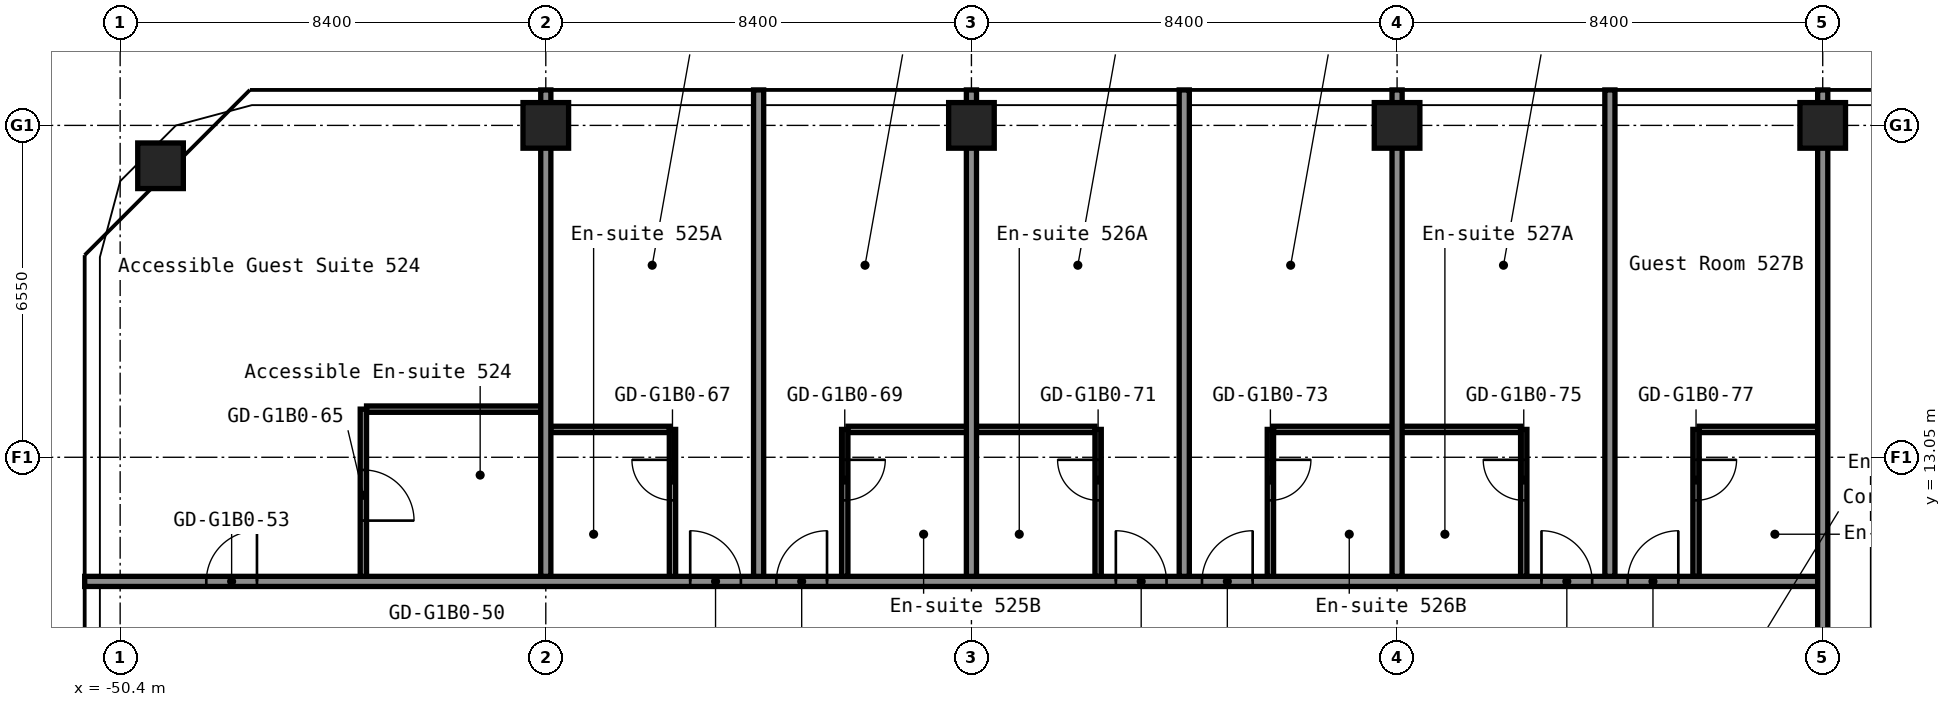
"""IFC4 building model, lengths in metres.
Left out: names, types, materials, properties, quantities, classifications, styles, units other than length and angle.
Written with IfcOpenShell. Run it as: python <this file> out.ifc"""

import sys

from ifc_helpers import new_model, si_unit, direction, frame, frame_2d, origin, origin_2d, place, context, subcontext, project, spatial, rectangle, hollow_rectangle, extrude, element, fill, save


model = new_model("IFC4")
c1 = context("Model", 3, precision=1e-05, world=origin(), true_north=direction((0.0, 1.0)))
c2 = subcontext(c1, "Body", "Model", "MODEL_VIEW")
j1 = project(units=[si_unit("LENGTHUNIT", "METRE"), si_unit("PLANEANGLEUNIT", "RADIAN")], contexts=[c1])
p1 = place(None, origin())
s1 = spatial("IfcSite", under=j1, at=p1, CompositionType="ELEMENT")
p2 = place(p1, origin())
s2 = spatial("IfcBuilding", under=s1, at=p2, CompositionType="ELEMENT")
p3 = place(p2, frame((0.0, 0.0, 23.0)))
s3 = spatial("IfcBuildingStorey", under=s2, at=p3, CompositionType="ELEMENT", Elevation=23.0)
for number, where, z_axis, x_axis in (
    (1, (-49.603, 18.803, 0.0), (0.0, 0.0, 1.0), (1.0, 0.0, 0.0)),
    (2, (-42.0, 19.6, 0.0), (0.0, 0.0, 1.0), (1.0, 0.0, 0.0)),
    (3, (-33.6, 19.6, 0.0), (0.0, 0.0, 1.0), (1.0, 0.0, 0.0)),
    (4, (-25.2, 19.6, 0.0), (0.0, 0.0, 1.0), (1.0, 0.0, 0.0)),
    (5, (-16.8, 19.6, 0.0), (0.0, 0.0, 1.0), (1.0, 0.0, 0.0)),
):
    element("IfcColumn", number, at=place(p3, frame(where, z_axis=z_axis, x_axis=x_axis)), inside=s3, PredefinedType="COLUMN", context=c2, shape_type="SweptSolid", body=[
        extrude(hollow_rectangle(XDim=0.9, YDim=0.9, WallThickness=0.036, at=origin_2d()), origin(), (0.0, 0.0, 1.0), 2.8),
    ])
p4 = place(p3, frame((-51.1, 10.6, 0.0), z_axis=(0.0, 0.0, 1.0), x_axis=(1.0, 0.0, 0.0)))
e6 = element("IfcWall", 6, at=p4, inside=s3, PredefinedType="PARTITIONING", context=c2, shape_type="SweptSolid", body=[
    extrude(rectangle(XDim=34.3, YDim=0.2, at=frame_2d((17.15, 0.0))), origin(), (0.0, 0.0, 1.0), 2.8),
])
p5 = place(p4, frame((2.4, 0.0, 0.0)))
e7 = element("IfcOpeningElement", 7, at=p5, cuts=e6, PredefinedType="OPENING", context=c2, shape_type="SweptSolid", body=[
    extrude(rectangle(XDim=1.0, YDim=2.1, at=frame_2d((0.5, 1.05))), frame((0.0, 0.11, 0.0), z_axis=(0.0, -1.0, 0.0), x_axis=(1.0, 0.0, 0.0)), (0.0, 0.0, 1.0), 0.22),
])
p6 = place(p4, frame((11.95, 0.0, 0.0)))
e8 = element("IfcOpeningElement", 8, at=p6, cuts=e6, PredefinedType="OPENING", context=c2, shape_type="SweptSolid", body=[
    extrude(rectangle(XDim=1.0, YDim=2.1, at=frame_2d((0.5, 1.05))), frame((0.0, 0.11, 0.0), z_axis=(0.0, -1.0, 0.0), x_axis=(1.0, 0.0, 0.0)), (0.0, 0.0, 1.0), 0.22),
])
p7 = place(p4, frame((13.65, 0.0, 0.0)))
e9 = element("IfcOpeningElement", 9, at=p7, cuts=e6, PredefinedType="OPENING", context=c2, shape_type="SweptSolid", body=[
    extrude(rectangle(XDim=1.0, YDim=2.1, at=frame_2d((0.5, 1.05))), frame((0.0, 0.11, 0.0), z_axis=(0.0, -1.0, 0.0), x_axis=(1.0, 0.0, 0.0)), (0.0, 0.0, 1.0), 0.22),
])
p8 = place(p4, frame((20.35, 0.0, 0.0)))
e10 = element("IfcOpeningElement", 10, at=p8, cuts=e6, PredefinedType="OPENING", context=c2, shape_type="SweptSolid", body=[
    extrude(rectangle(XDim=1.0, YDim=2.1, at=frame_2d((0.5, 1.05))), frame((0.0, 0.11, 0.0), z_axis=(0.0, -1.0, 0.0), x_axis=(1.0, 0.0, 0.0)), (0.0, 0.0, 1.0), 0.22),
])
p9 = place(p4, frame((22.05, 0.0, 0.0)))
e11 = element("IfcOpeningElement", 11, at=p9, cuts=e6, PredefinedType="OPENING", context=c2, shape_type="SweptSolid", body=[
    extrude(rectangle(XDim=1.0, YDim=2.1, at=frame_2d((0.5, 1.05))), frame((0.0, 0.11, 0.0), z_axis=(0.0, -1.0, 0.0), x_axis=(1.0, 0.0, 0.0)), (0.0, 0.0, 1.0), 0.22),
])
p10 = place(p4, frame((28.75, 0.0, 0.0)))
e12 = element("IfcOpeningElement", 12, at=p10, cuts=e6, PredefinedType="OPENING", context=c2, shape_type="SweptSolid", body=[
    extrude(rectangle(XDim=1.0, YDim=2.1, at=frame_2d((0.5, 1.05))), frame((0.0, 0.11, 0.0), z_axis=(0.0, -1.0, 0.0), x_axis=(1.0, 0.0, 0.0)), (0.0, 0.0, 1.0), 0.22),
])
p11 = place(p4, frame((30.45, 0.0, 0.0)))
e13 = element("IfcOpeningElement", 13, at=p11, cuts=e6, PredefinedType="OPENING", context=c2, shape_type="SweptSolid", body=[
    extrude(rectangle(XDim=1.0, YDim=2.1, at=frame_2d((0.5, 1.05))), frame((0.0, 0.11, 0.0), z_axis=(0.0, -1.0, 0.0), x_axis=(1.0, 0.0, 0.0)), (0.0, 0.0, 1.0), 0.22),
])
p12 = place(p3, frame((-41.9, 13.6, 0.0), z_axis=(0.0, 0.0, 1.0), x_axis=(1.0, 0.0, 0.0)))
e14 = element("IfcWall", 14, at=p12, inside=s3, PredefinedType="PARTITIONING", context=c2, shape_type="SweptSolid", body=[
    extrude(rectangle(XDim=2.337, YDim=0.125, at=frame_2d((1.169, 0.0))), origin(), (0.0, 0.0, 1.0), 2.8),
])
for number, where, z_axis, x_axis in (
    (15, (-36.038, 13.6, 0.0), (0.0, 0.0, 1.0), (1.0, 0.0, 0.0)),
    (16, (-27.637, 13.6, 0.0), (0.0, 0.0, 1.0), (1.0, 0.0, 0.0)),
):
    element("IfcWall", number, at=place(p3, frame(where, z_axis=z_axis, x_axis=x_axis)), inside=s3, PredefinedType="PARTITIONING", context=c2, shape_type="SweptSolid", body=[
        extrude(rectangle(XDim=4.875, YDim=0.125, at=frame_2d((2.438, 0.0))), origin(), (0.0, 0.0, 1.0), 2.8),
    ])
p13 = place(p3, frame((-19.238, 13.6, 0.0), z_axis=(0.0, 0.0, 1.0), x_axis=(1.0, 0.0, 0.0)))
e17 = element("IfcWall", 17, at=p13, inside=s3, PredefinedType="PARTITIONING", context=c2, shape_type="SweptSolid", body=[
    extrude(rectangle(XDim=2.338, YDim=0.125, at=frame_2d((1.169, 0.0))), origin(), (0.0, 0.0, 1.0), 2.8),
])
p14 = place(p3, frame((-45.538, 14.0, 0.0), z_axis=(0.0, 0.0, 1.0), x_axis=(1.0, 0.0, 0.0)))
e18 = element("IfcWall", 18, at=p14, inside=s3, PredefinedType="PARTITIONING", context=c2, shape_type="SweptSolid", body=[
    extrude(rectangle(XDim=3.438, YDim=0.125, at=frame_2d((1.719, 0.0))), origin(), (0.0, 0.0, 1.0), 2.8),
])
p15 = place(p3, frame((-45.6, 10.7, 0.0), z_axis=(0.0, 0.0, 1.0), x_axis=(0.0, 1.0, 0.0)))
e19 = element("IfcWall", 19, at=p15, inside=s3, PredefinedType="PARTITIONING", context=c2, shape_type="SweptSolid", body=[
    extrude(rectangle(XDim=3.3, YDim=0.125, at=frame_2d((1.65, 0.0))), origin(), (0.0, 0.0, 1.0), 2.8),
])
p16 = place(p15, frame((1.1, 0.0, 0.0)))
e20 = element("IfcOpeningElement", 20, at=p16, cuts=e19, PredefinedType="OPENING", context=c2, shape_type="SweptSolid", body=[
    extrude(rectangle(XDim=1.0, YDim=2.1, at=frame_2d((0.5, 1.05))), frame((0.0, 0.073, 0.0), z_axis=(0.0, -1.0, 0.0), x_axis=(1.0, 0.0, 0.0)), (0.0, 0.0, 1.0), 0.145),
])
p17 = place(p3, frame((-42.0, 10.7, 0.0), z_axis=(0.0, 0.0, 1.0), x_axis=(0.0, 1.0, 0.0)))
e21 = element("IfcWall", 21, at=p17, inside=s3, PredefinedType="PARTITIONING", context=c2, shape_type="SweptSolid", body=[
    extrude(rectangle(XDim=9.6, YDim=0.2, at=frame_2d((4.8, 0.0))), origin(), (0.0, 0.0, 1.0), 2.8),
])
p18 = place(p3, frame((-39.5, 10.7, 0.0), z_axis=(0.0, 0.0, 1.0), x_axis=(0.0, 1.0, 0.0)))
e22 = element("IfcWall", 22, at=p18, inside=s3, PredefinedType="PARTITIONING", context=c2, shape_type="SweptSolid", body=[
    extrude(rectangle(XDim=2.9, YDim=0.125, at=frame_2d((1.45, 0.0))), origin(), (0.0, 0.0, 1.0), 2.8),
])
p19 = place(p18, frame((1.5, 0.0, 0.0)))
e23 = element("IfcOpeningElement", 23, at=p19, cuts=e22, PredefinedType="OPENING", context=c2, shape_type="SweptSolid", body=[
    extrude(rectangle(XDim=0.8, YDim=2.1, at=frame_2d((0.4, 1.05))), frame((0.0, 0.073, 0.0), z_axis=(0.0, -1.0, 0.0), x_axis=(1.0, 0.0, 0.0)), (0.0, 0.0, 1.0), 0.145),
])
p20 = place(p3, frame((-37.8, 10.7, 0.0), z_axis=(0.0, 0.0, 1.0), x_axis=(0.0, 1.0, 0.0)))
e24 = element("IfcWall", 24, at=p20, inside=s3, PredefinedType="PARTITIONING", context=c2, shape_type="SweptSolid", body=[
    extrude(rectangle(XDim=9.6, YDim=0.2, at=frame_2d((4.8, 0.0))), origin(), (0.0, 0.0, 1.0), 2.8),
])
p21 = place(p3, frame((-36.1, 10.7, 0.0), z_axis=(0.0, 0.0, 1.0), x_axis=(0.0, 1.0, 0.0)))
e25 = element("IfcWall", 25, at=p21, inside=s3, PredefinedType="PARTITIONING", context=c2, shape_type="SweptSolid", body=[
    extrude(rectangle(XDim=2.9, YDim=0.125, at=frame_2d((1.45, 0.0))), origin(), (0.0, 0.0, 1.0), 2.8),
])
p22 = place(p21, frame((1.5, 0.0, 0.0)))
e26 = element("IfcOpeningElement", 26, at=p22, cuts=e25, PredefinedType="OPENING", context=c2, shape_type="SweptSolid", body=[
    extrude(rectangle(XDim=0.8, YDim=2.1, at=frame_2d((0.4, 1.05))), frame((0.0, 0.073, 0.0), z_axis=(0.0, -1.0, 0.0), x_axis=(1.0, 0.0, 0.0)), (0.0, 0.0, 1.0), 0.145),
])
p23 = place(p3, frame((-33.6, 10.7, 0.0), z_axis=(0.0, 0.0, 1.0), x_axis=(0.0, 1.0, 0.0)))
e27 = element("IfcWall", 27, at=p23, inside=s3, PredefinedType="PARTITIONING", context=c2, shape_type="SweptSolid", body=[
    extrude(rectangle(XDim=9.6, YDim=0.2, at=frame_2d((4.8, 0.0))), origin(), (0.0, 0.0, 1.0), 2.8),
])
p24 = place(p3, frame((-31.1, 10.7, 0.0), z_axis=(0.0, 0.0, 1.0), x_axis=(0.0, 1.0, 0.0)))
e28 = element("IfcWall", 28, at=p24, inside=s3, PredefinedType="PARTITIONING", context=c2, shape_type="SweptSolid", body=[
    extrude(rectangle(XDim=2.9, YDim=0.125, at=frame_2d((1.45, 0.0))), origin(), (0.0, 0.0, 1.0), 2.8),
])
p25 = place(p24, frame((1.5, 0.0, 0.0)))
e29 = element("IfcOpeningElement", 29, at=p25, cuts=e28, PredefinedType="OPENING", context=c2, shape_type="SweptSolid", body=[
    extrude(rectangle(XDim=0.8, YDim=2.1, at=frame_2d((0.4, 1.05))), frame((0.0, 0.073, 0.0), z_axis=(0.0, -1.0, 0.0), x_axis=(1.0, 0.0, 0.0)), (0.0, 0.0, 1.0), 0.145),
])
p26 = place(p3, frame((-29.4, 10.7, 0.0), z_axis=(0.0, 0.0, 1.0), x_axis=(0.0, 1.0, 0.0)))
e30 = element("IfcWall", 30, at=p26, inside=s3, PredefinedType="PARTITIONING", context=c2, shape_type="SweptSolid", body=[
    extrude(rectangle(XDim=9.6, YDim=0.2, at=frame_2d((4.8, 0.0))), origin(), (0.0, 0.0, 1.0), 2.8),
])
p27 = place(p3, frame((-27.7, 10.7, 0.0), z_axis=(0.0, 0.0, 1.0), x_axis=(0.0, 1.0, 0.0)))
e31 = element("IfcWall", 31, at=p27, inside=s3, PredefinedType="PARTITIONING", context=c2, shape_type="SweptSolid", body=[
    extrude(rectangle(XDim=2.9, YDim=0.125, at=frame_2d((1.45, 0.0))), origin(), (0.0, 0.0, 1.0), 2.8),
])
p28 = place(p27, frame((1.5, 0.0, 0.0)))
e32 = element("IfcOpeningElement", 32, at=p28, cuts=e31, PredefinedType="OPENING", context=c2, shape_type="SweptSolid", body=[
    extrude(rectangle(XDim=0.8, YDim=2.1, at=frame_2d((0.4, 1.05))), frame((0.0, 0.073, 0.0), z_axis=(0.0, -1.0, 0.0), x_axis=(1.0, 0.0, 0.0)), (0.0, 0.0, 1.0), 0.145),
])
p29 = place(p3, frame((-25.2, 10.7, 0.0), z_axis=(0.0, 0.0, 1.0), x_axis=(0.0, 1.0, 0.0)))
e33 = element("IfcWall", 33, at=p29, inside=s3, PredefinedType="PARTITIONING", context=c2, shape_type="SweptSolid", body=[
    extrude(rectangle(XDim=9.6, YDim=0.2, at=frame_2d((4.8, 0.0))), origin(), (0.0, 0.0, 1.0), 2.8),
])
p30 = place(p3, frame((-22.7, 10.7, 0.0), z_axis=(0.0, 0.0, 1.0), x_axis=(0.0, 1.0, 0.0)))
e34 = element("IfcWall", 34, at=p30, inside=s3, PredefinedType="PARTITIONING", context=c2, shape_type="SweptSolid", body=[
    extrude(rectangle(XDim=2.9, YDim=0.125, at=frame_2d((1.45, 0.0))), origin(), (0.0, 0.0, 1.0), 2.8),
])
p31 = place(p30, frame((1.5, 0.0, 0.0)))
e35 = element("IfcOpeningElement", 35, at=p31, cuts=e34, PredefinedType="OPENING", context=c2, shape_type="SweptSolid", body=[
    extrude(rectangle(XDim=0.8, YDim=2.1, at=frame_2d((0.4, 1.05))), frame((0.0, 0.073, 0.0), z_axis=(0.0, -1.0, 0.0), x_axis=(1.0, 0.0, 0.0)), (0.0, 0.0, 1.0), 0.145),
])
p32 = place(p3, frame((-21.0, 10.7, 0.0), z_axis=(0.0, 0.0, 1.0), x_axis=(0.0, 1.0, 0.0)))
e36 = element("IfcWall", 36, at=p32, inside=s3, PredefinedType="PARTITIONING", context=c2, shape_type="SweptSolid", body=[
    extrude(rectangle(XDim=9.6, YDim=0.2, at=frame_2d((4.8, 0.0))), origin(), (0.0, 0.0, 1.0), 2.8),
])
p33 = place(p3, frame((-19.3, 10.7, 0.0), z_axis=(0.0, 0.0, 1.0), x_axis=(0.0, 1.0, 0.0)))
e37 = element("IfcWall", 37, at=p33, inside=s3, PredefinedType="PARTITIONING", context=c2, shape_type="SweptSolid", body=[
    extrude(rectangle(XDim=2.9, YDim=0.125, at=frame_2d((1.45, 0.0))), origin(), (0.0, 0.0, 1.0), 2.8),
])
p34 = place(p33, frame((1.5, 0.0, 0.0)))
e38 = element("IfcOpeningElement", 38, at=p34, cuts=e37, PredefinedType="OPENING", context=c2, shape_type="SweptSolid", body=[
    extrude(rectangle(XDim=0.8, YDim=2.1, at=frame_2d((0.4, 1.05))), frame((0.0, 0.073, 0.0), z_axis=(0.0, -1.0, 0.0), x_axis=(1.0, 0.0, 0.0)), (0.0, 0.0, 1.0), 0.145),
])
p35 = place(p3, frame((-16.8, 8.39, 0.0), z_axis=(0.0, 0.0, 1.0), x_axis=(0.0, 1.0, 0.0)))
e39 = element("IfcWall", 39, at=p35, inside=s3, PredefinedType="PARTITIONING", context=c2, shape_type="SweptSolid", body=[
    extrude(rectangle(XDim=11.91, YDim=0.2, at=frame_2d((5.955, 0.0))), origin(), (0.0, 0.0, 1.0), 2.8),
])
p36 = place(p5, origin())
e40 = element("IfcDoor", 40, at=p36, inside=s3, OperationType="SINGLE_SWING_LEFT", PredefinedType="DOOR", context=c2, shape_type="SweptSolid", body=[
    extrude(rectangle(XDim=1.0, YDim=2.1, at=frame_2d((0.5, 1.05))), frame((0.0, 0.025, 0.0), z_axis=(0.0, -1.0, 0.0), x_axis=(1.0, 0.0, 0.0)), (0.0, 0.0, 1.0), 0.05),
])
fill(e7, e40)
p37 = place(p6, origin())
e41 = element("IfcDoor", 41, at=p37, inside=s3, OperationType="SINGLE_SWING_RIGHT", PredefinedType="DOOR", context=c2, shape_type="SweptSolid", body=[
    extrude(rectangle(XDim=1.0, YDim=2.1, at=frame_2d((0.5, 1.05))), frame((0.0, 0.025, 0.0), z_axis=(0.0, -1.0, 0.0), x_axis=(1.0, 0.0, 0.0)), (0.0, 0.0, 1.0), 0.05),
])
fill(e8, e41)
p38 = place(p7, origin())
e42 = element("IfcDoor", 42, at=p38, inside=s3, OperationType="SINGLE_SWING_LEFT", PredefinedType="DOOR", context=c2, shape_type="SweptSolid", body=[
    extrude(rectangle(XDim=1.0, YDim=2.1, at=frame_2d((0.5, 1.05))), frame((0.0, 0.025, 0.0), z_axis=(0.0, -1.0, 0.0), x_axis=(1.0, 0.0, 0.0)), (0.0, 0.0, 1.0), 0.05),
])
fill(e9, e42)
p39 = place(p8, origin())
e43 = element("IfcDoor", 43, at=p39, inside=s3, OperationType="SINGLE_SWING_RIGHT", PredefinedType="DOOR", context=c2, shape_type="SweptSolid", body=[
    extrude(rectangle(XDim=1.0, YDim=2.1, at=frame_2d((0.5, 1.05))), frame((0.0, 0.025, 0.0), z_axis=(0.0, -1.0, 0.0), x_axis=(1.0, 0.0, 0.0)), (0.0, 0.0, 1.0), 0.05),
])
fill(e10, e43)
p40 = place(p9, origin())
e44 = element("IfcDoor", 44, at=p40, inside=s3, OperationType="SINGLE_SWING_LEFT", PredefinedType="DOOR", context=c2, shape_type="SweptSolid", body=[
    extrude(rectangle(XDim=1.0, YDim=2.1, at=frame_2d((0.5, 1.05))), frame((0.0, 0.025, 0.0), z_axis=(0.0, -1.0, 0.0), x_axis=(1.0, 0.0, 0.0)), (0.0, 0.0, 1.0), 0.05),
])
fill(e11, e44)
p41 = place(p10, origin())
e45 = element("IfcDoor", 45, at=p41, inside=s3, OperationType="SINGLE_SWING_RIGHT", PredefinedType="DOOR", context=c2, shape_type="SweptSolid", body=[
    extrude(rectangle(XDim=1.0, YDim=2.1, at=frame_2d((0.5, 1.05))), frame((0.0, 0.025, 0.0), z_axis=(0.0, -1.0, 0.0), x_axis=(1.0, 0.0, 0.0)), (0.0, 0.0, 1.0), 0.05),
])
fill(e12, e45)
p42 = place(p11, origin())
e46 = element("IfcDoor", 46, at=p42, inside=s3, OperationType="SINGLE_SWING_LEFT", PredefinedType="DOOR", context=c2, shape_type="SweptSolid", body=[
    extrude(rectangle(XDim=1.0, YDim=2.1, at=frame_2d((0.5, 1.05))), frame((0.0, 0.025, 0.0), z_axis=(0.0, -1.0, 0.0), x_axis=(1.0, 0.0, 0.0)), (0.0, 0.0, 1.0), 0.05),
])
fill(e13, e46)
p43 = place(p16, origin())
e47 = element("IfcDoor", 47, at=p43, inside=s3, OperationType="SINGLE_SWING_LEFT", PredefinedType="DOOR", context=c2, shape_type="SweptSolid", body=[
    extrude(rectangle(XDim=1.0, YDim=2.1, at=frame_2d((0.5, 1.05))), frame((0.0, 0.025, 0.0), z_axis=(0.0, -1.0, 0.0), x_axis=(1.0, 0.0, 0.0)), (0.0, 0.0, 1.0), 0.05),
])
fill(e20, e47)
p44 = place(p19, origin())
e48 = element("IfcDoor", 48, at=p44, inside=s3, OperationType="SINGLE_SWING_LEFT", PredefinedType="DOOR", context=c2, shape_type="SweptSolid", body=[
    extrude(rectangle(XDim=0.8, YDim=2.1, at=frame_2d((0.4, 1.05))), frame((0.0, 0.025, 0.0), z_axis=(0.0, -1.0, 0.0), x_axis=(1.0, 0.0, 0.0)), (0.0, 0.0, 1.0), 0.05),
])
fill(e23, e48)
p45 = place(p22, origin())
e49 = element("IfcDoor", 49, at=p45, inside=s3, OperationType="SINGLE_SWING_RIGHT", PredefinedType="DOOR", context=c2, shape_type="SweptSolid", body=[
    extrude(rectangle(XDim=0.8, YDim=2.1, at=frame_2d((0.4, 1.05))), frame((0.0, 0.025, 0.0), z_axis=(0.0, -1.0, 0.0), x_axis=(1.0, 0.0, 0.0)), (0.0, 0.0, 1.0), 0.05),
])
fill(e26, e49)
p46 = place(p25, origin())
e50 = element("IfcDoor", 50, at=p46, inside=s3, OperationType="SINGLE_SWING_LEFT", PredefinedType="DOOR", context=c2, shape_type="SweptSolid", body=[
    extrude(rectangle(XDim=0.8, YDim=2.1, at=frame_2d((0.4, 1.05))), frame((0.0, 0.025, 0.0), z_axis=(0.0, -1.0, 0.0), x_axis=(1.0, 0.0, 0.0)), (0.0, 0.0, 1.0), 0.05),
])
fill(e29, e50)
p47 = place(p28, origin())
e51 = element("IfcDoor", 51, at=p47, inside=s3, OperationType="SINGLE_SWING_RIGHT", PredefinedType="DOOR", context=c2, shape_type="SweptSolid", body=[
    extrude(rectangle(XDim=0.8, YDim=2.1, at=frame_2d((0.4, 1.05))), frame((0.0, 0.025, 0.0), z_axis=(0.0, -1.0, 0.0), x_axis=(1.0, 0.0, 0.0)), (0.0, 0.0, 1.0), 0.05),
])
fill(e32, e51)
p48 = place(p31, origin())
e52 = element("IfcDoor", 52, at=p48, inside=s3, OperationType="SINGLE_SWING_LEFT", PredefinedType="DOOR", context=c2, shape_type="SweptSolid", body=[
    extrude(rectangle(XDim=0.8, YDim=2.1, at=frame_2d((0.4, 1.05))), frame((0.0, 0.025, 0.0), z_axis=(0.0, -1.0, 0.0), x_axis=(1.0, 0.0, 0.0)), (0.0, 0.0, 1.0), 0.05),
])
fill(e35, e52)
p49 = place(p34, origin())
e53 = element("IfcDoor", 53, at=p49, inside=s3, OperationType="SINGLE_SWING_RIGHT", PredefinedType="DOOR", context=c2, shape_type="SweptSolid", body=[
    extrude(rectangle(XDim=0.8, YDim=2.1, at=frame_2d((0.4, 1.05))), frame((0.0, 0.025, 0.0), z_axis=(0.0, -1.0, 0.0), x_axis=(1.0, 0.0, 0.0)), (0.0, 0.0, 1.0), 0.05),
])
fill(e38, e53)
save(model, sys.argv[1])
